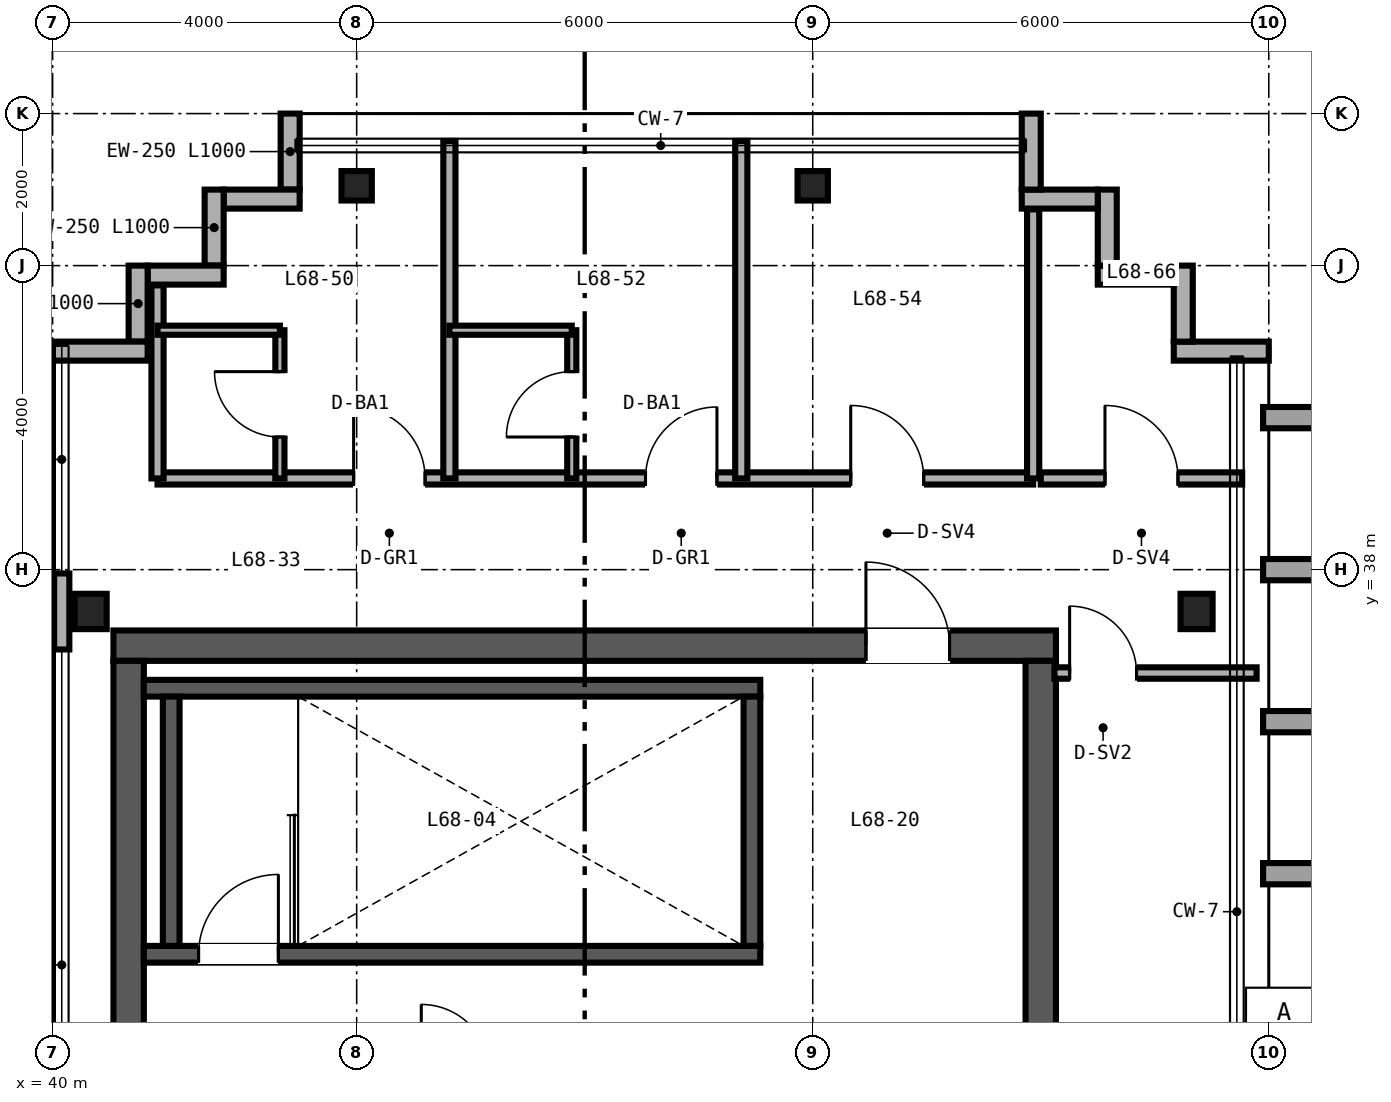
"""IFC4 building model, lengths in metres.
Left out: names, types, materials, properties, quantities, classifications, styles, units other than length and angle.
Written with IfcOpenShell. Run it as: python <this file> out.ifc"""

import sys

from ifc_helpers import new_model, si_unit, direction, frame, frame_2d, origin, origin_2d, place, context, subcontext, project, spatial, rectangle, i_section, extrude, source, transform, mapped, element, fill, save


model = new_model("IFC4")
c1 = context("Model", 3, precision=1e-05, world=origin(), true_north=direction((0.0, 1.0)))
c2 = subcontext(c1, "Body", "Model", "MODEL_VIEW")
j1 = project(units=[si_unit("LENGTHUNIT", "METRE"), si_unit("PLANEANGLEUNIT", "RADIAN")], contexts=[c1])
p1 = place(None, origin())
s1 = spatial("IfcSite", under=j1, at=p1, CompositionType="ELEMENT")
p2 = place(p1, origin())
s2 = spatial("IfcBuilding", under=s1, at=p2, CompositionType="ELEMENT")
p3 = place(p2, frame((0.0, 0.0, 268.8)))
s3 = spatial("IfcBuildingStorey", under=s2, at=p3, CompositionType="ELEMENT", Elevation=268.8)
p4 = place(p3, frame((40.8, 37.0, 0.0), z_axis=(0.0, 0.0, 1.0), x_axis=(1.0, 0.0, 0.0)))
e1 = element("IfcWall", 1, at=p4, inside=s3, PredefinedType="SHEAR", context=c2, shape_type="SweptSolid", body=[
    extrude(rectangle(XDim=12.4, YDim=0.4, at=frame_2d((6.2, 0.0))), origin(), (0.0, 0.0, 1.0), 3.28),
])
p5 = place(p4, frame((9.9, 0.0, 0.0)))
e2 = element("IfcOpeningElement", 2, at=p5, cuts=e1, PredefinedType="OPENING", context=c2, shape_type="SweptSolid", body=[
    extrude(rectangle(XDim=1.1, YDim=2.15, at=frame_2d((0.55, 1.075))), frame((0.0, 0.21, 0.0), z_axis=(0.0, -1.0, 0.0), x_axis=(1.0, 0.0, 0.0)), (0.0, 0.0, 1.0), 0.42),
])
for number, where, z_axis, x_axis in (
    (3, (41.0, 15.2, 0.0), (0.0, 0.0, 1.0), (0.0, 1.0, 0.0)),
    (4, (53.0, 15.2, 0.0), (0.0, 0.0, 1.0), (0.0, 1.0, 0.0)),
):
    element("IfcWall", number, at=place(p3, frame(where, z_axis=z_axis, x_axis=x_axis)), inside=s3, PredefinedType="SHEAR", context=c2, shape_type="SweptSolid", body=[
        extrude(rectangle(XDim=21.6, YDim=0.4, at=frame_2d((10.8, 0.0))), origin(), (0.0, 0.0, 1.0), 3.28),
    ])
p6 = place(p3, frame((41.2, 32.94, 0.0), z_axis=(0.0, 0.0, 1.0), x_axis=(1.0, 0.0, 0.0)))
e5 = element("IfcWall", 5, at=p6, inside=s3, PredefinedType="SHEAR", context=c2, shape_type="SweptSolid", body=[
    extrude(rectangle(XDim=8.11, YDim=0.22, at=frame_2d((4.055, 0.0))), origin(), (0.0, 0.0, 1.0), 3.4),
])
p7 = place(p6, frame((0.72, 0.0, 0.0)))
e6 = element("IfcOpeningElement", 6, at=p7, cuts=e5, PredefinedType="OPENING", context=c2, shape_type="SweptSolid", body=[
    extrude(rectangle(XDim=1.05, YDim=2.15, at=frame_2d((0.525, 1.075))), frame((0.0, 0.12, 0.0), z_axis=(0.0, -1.0, 0.0), x_axis=(1.0, 0.0, 0.0)), (0.0, 0.0, 1.0), 0.24),
])
p8 = place(p3, frame((41.2, 36.44, 0.0), z_axis=(0.0, 0.0, 1.0), x_axis=(1.0, 0.0, 0.0)))
e7 = element("IfcWall", 7, at=p8, inside=s3, PredefinedType="SHEAR", context=c2, shape_type="SweptSolid", body=[
    extrude(rectangle(XDim=8.11, YDim=0.22, at=frame_2d((4.055, 0.0))), origin(), (0.0, 0.0, 1.0), 3.4),
])
for number, where, z_axis, x_axis in (
    (8, (41.56, 33.05, 0.0), (0.0, 0.0, 1.0), (0.0, 1.0, 0.0)),
    (9, (49.2, 33.05, 0.0), (0.0, 0.0, 1.0), (0.0, 1.0, 0.0)),
):
    element("IfcWall", number, at=place(p3, frame(where, z_axis=z_axis, x_axis=x_axis)), inside=s3, PredefinedType="SHEAR", context=c2, shape_type="SweptSolid", body=[
        extrude(rectangle(XDim=3.28, YDim=0.22, at=frame_2d((1.64, 0.0))), origin(), (0.0, 0.0, 1.0), 3.4),
    ])
m1 = source(origin(), c2, "Body", "SweptSolid", [
    extrude(i_section(OverallWidth=0.422, OverallDepth=0.465, WebThickness=0.045, FlangeThickness=0.073, FilletRadius=0.025, at=origin_2d()), origin(), (0.0, 0.0, 1.0), 3.28),
])
for number, where, z_axis, x_axis in (
    (10, (40.5, 37.45, 0.0), (0.0, 0.0, 1.0), (1.0, 0.0, 0.0)),
    (11, (55.05, 37.45, 0.0), (0.0, 0.0, 1.0), (1.0, 0.0, 0.0)),
):
    element("IfcColumn", number, at=place(p3, frame(where, z_axis=z_axis, x_axis=x_axis)), inside=s3, PredefinedType="COLUMN", context=c2, shape_type="MappedRepresentation", body=[
        mapped(m1, transform((0.0, 0.0, 0.0), scale=1.0)),
    ])
m2 = source(origin(), c2, "Body", "SweptSolid", [
    extrude(i_section(OverallWidth=0.399, OverallDepth=0.387, WebThickness=0.021, FlangeThickness=0.033, FilletRadius=0.025, at=origin_2d()), origin(), (0.0, 0.0, 1.0), 3.28),
])
for number, where, z_axis, x_axis in (
    (12, (44.0, 43.05, 0.0), (0.0, 0.0, 1.0), (1.0, 0.0, 0.0)),
    (13, (50.0, 43.05, 0.0), (0.0, 0.0, 1.0), (1.0, 0.0, 0.0)),
):
    element("IfcColumn", number, at=place(p3, frame(where, z_axis=z_axis, x_axis=x_axis)), inside=s3, PredefinedType="COLUMN", context=c2, shape_type="MappedRepresentation", body=[
        mapped(m2, transform((0.0, 0.0, 0.0), scale=1.0)),
    ])
p9 = place(p3, frame((56.0, 40.875, 0.0), z_axis=(0.0, 0.0, 1.0), x_axis=(-1.0, 0.0, 0.0)))
e14 = element("IfcWall", 14, at=p9, inside=s3, PredefinedType="SOLIDWALL", context=c2, shape_type="SweptSolid", body=[
    extrude(rectangle(XDim=1.25, YDim=0.25, at=frame_2d((0.625, 0.0))), origin(), (0.0, 0.0, 1.0), 3.28),
])
for number, where, z_axis, x_axis in (
    (15, (54.875, 41.0, 0.0), (0.0, 0.0, 1.0), (0.0, 1.0, 0.0)),
    (16, (54.75, 41.875, 0.0), (0.0, 0.0, 1.0), (-1.0, 0.0, 0.0)),
    (17, (53.875, 42.0, 0.0), (0.0, 0.0, 1.0), (0.0, 1.0, 0.0)),
    (18, (53.75, 42.875, 0.0), (0.0, 0.0, 1.0), (-1.0, 0.0, 0.0)),
    (19, (52.875, 43.0, 0.0), (0.0, 0.0, 1.0), (0.0, 1.0, 0.0)),
    (20, (43.125, 44.0, 0.0), (0.0, 0.0, 1.0), (0.0, -1.0, 0.0)),
    (21, (43.25, 42.875, 0.0), (0.0, 0.0, 1.0), (-1.0, 0.0, 0.0)),
    (22, (42.125, 43.0, 0.0), (0.0, 0.0, 1.0), (0.0, -1.0, 0.0)),
    (23, (42.25, 41.875, 0.0), (0.0, 0.0, 1.0), (-1.0, 0.0, 0.0)),
    (24, (41.125, 42.0, 0.0), (0.0, 0.0, 1.0), (0.0, -1.0, 0.0)),
):
    element("IfcWall", number, at=place(p3, frame(where, z_axis=z_axis, x_axis=x_axis)), inside=s3, PredefinedType="SOLIDWALL", context=c2, shape_type="SweptSolid", body=[
        extrude(rectangle(XDim=1.0, YDim=0.25, at=frame_2d((0.5, 0.0))), origin(), (0.0, 0.0, 1.0), 3.28),
    ])
p10 = place(p3, frame((41.25, 40.875, 0.0), z_axis=(0.0, 0.0, 1.0), x_axis=(-1.0, 0.0, 0.0)))
e25 = element("IfcWall", 25, at=p10, inside=s3, PredefinedType="SOLIDWALL", context=c2, shape_type="SweptSolid", body=[
    extrude(rectangle(XDim=1.25, YDim=0.25, at=frame_2d((0.625, 0.0))), origin(), (0.0, 0.0, 1.0), 3.28),
])
p11 = place(p3, frame((40.12, 36.95, 0.0), z_axis=(0.0, 0.0, 1.0), x_axis=(0.0, 1.0, 0.0)))
e26 = element("IfcWall", 26, at=p11, inside=s3, PredefinedType="PARAPET", context=c2, shape_type="SweptSolid", body=[
    extrude(rectangle(XDim=1.0, YDim=0.2, at=frame_2d((0.5, 0.0))), origin(), (0.0, 0.0, 1.0), 1.73),
])
p12 = place(p3, frame((41.38, 39.2, 0.0), z_axis=(0.0, 0.0, 1.0), x_axis=(1.0, 0.0, 0.0)))
e27 = element("IfcWall", 27, at=p12, inside=s3, PredefinedType="PARTITIONING", context=c2, shape_type="SweptSolid", body=[
    extrude(rectangle(XDim=11.52, YDim=0.16, at=frame_2d((5.76, 0.0))), origin(), (0.0, 0.0, 1.0), 3.28),
])
p13 = place(p12, frame((2.58, 0.0, 0.0)))
e28 = element("IfcOpeningElement", 28, at=p13, cuts=e27, PredefinedType="OPENING", context=c2, shape_type="SweptSolid", body=[
    extrude(rectangle(XDim=0.94, YDim=2.15, at=frame_2d((0.47, 1.075))), frame((0.0, 0.09, 0.0), z_axis=(0.0, -1.0, 0.0), x_axis=(1.0, 0.0, 0.0)), (0.0, 0.0, 1.0), 0.18),
])
p14 = place(p12, frame((6.42, 0.0, 0.0)))
e29 = element("IfcOpeningElement", 29, at=p14, cuts=e27, PredefinedType="OPENING", context=c2, shape_type="SweptSolid", body=[
    extrude(rectangle(XDim=0.94, YDim=2.15, at=frame_2d((0.47, 1.075))), frame((0.0, 0.09, 0.0), z_axis=(0.0, -1.0, 0.0), x_axis=(1.0, 0.0, 0.0)), (0.0, 0.0, 1.0), 0.18),
])
p15 = place(p12, frame((9.12, 0.0, 0.0)))
e30 = element("IfcOpeningElement", 30, at=p15, cuts=e27, PredefinedType="OPENING", context=c2, shape_type="SweptSolid", body=[
    extrude(rectangle(XDim=0.96, YDim=2.15, at=frame_2d((0.48, 1.075))), frame((0.0, 0.09, 0.0), z_axis=(0.0, -1.0, 0.0), x_axis=(1.0, 0.0, 0.0)), (0.0, 0.0, 1.0), 0.18),
])
p16 = place(p3, frame((41.38, 39.2, 0.0), z_axis=(0.0, 0.0, 1.0), x_axis=(0.0, 1.0, 0.0)))
e31 = element("IfcWall", 31, at=p16, inside=s3, PredefinedType="PARTITIONING", context=c2, shape_type="SweptSolid", body=[
    extrude(rectangle(XDim=2.54, YDim=0.16, at=frame_2d((1.27, 0.0))), origin(), (0.0, 0.0, 1.0), 3.28),
])
p17 = place(p3, frame((52.9, 39.2, 0.0), z_axis=(0.0, 0.0, 1.0), x_axis=(0.0, 1.0, 0.0)))
e32 = element("IfcWall", 32, at=p17, inside=s3, PredefinedType="PARTITIONING", context=c2, shape_type="SweptSolid", body=[
    extrude(rectangle(XDim=3.54, YDim=0.16, at=frame_2d((1.77, 0.0))), origin(), (0.0, 0.0, 1.0), 3.28),
])
p18 = place(p3, frame((45.22, 39.2, 0.0), z_axis=(0.0, 0.0, 1.0), x_axis=(0.0, 1.0, 0.0)))
e33 = element("IfcWall", 33, at=p18, inside=s3, PredefinedType="PARTITIONING", context=c2, shape_type="SweptSolid", body=[
    extrude(rectangle(XDim=4.44, YDim=0.16, at=frame_2d((2.22, 0.0))), origin(), (0.0, 0.0, 1.0), 2.587),
])
p19 = place(p3, frame((42.99, 39.2, 0.0), z_axis=(0.0, 0.0, 1.0), x_axis=(0.0, 1.0, 0.0)))
e34 = element("IfcWall", 34, at=p19, inside=s3, PredefinedType="PARTITIONING", context=c2, shape_type="SweptSolid", body=[
    extrude(rectangle(XDim=1.95, YDim=0.12, at=frame_2d((0.975, 0.0))), origin(), (0.0, 0.0, 1.0), 3.28),
])
p20 = place(p19, frame((0.545, 0.0, 0.0)))
e35 = element("IfcOpeningElement", 35, at=p20, cuts=e34, PredefinedType="OPENING", context=c2, shape_type="SweptSolid", body=[
    extrude(rectangle(XDim=0.86, YDim=2.1, at=frame_2d((0.43, 1.05))), frame((0.0, 0.07, 0.0), z_axis=(0.0, -1.0, 0.0), x_axis=(1.0, 0.0, 0.0)), (0.0, 0.0, 1.0), 0.14),
])
p21 = place(p3, frame((41.38, 41.15, 0.0), z_axis=(0.0, 0.0, 1.0), x_axis=(1.0, 0.0, 0.0)))
e36 = element("IfcWall", 36, at=p21, inside=s3, PredefinedType="PARTITIONING", context=c2, shape_type="SweptSolid", body=[
    extrude(rectangle(XDim=1.61, YDim=0.12, at=frame_2d((0.805, 0.0))), origin(), (0.0, 0.0, 1.0), 3.28),
])
p22 = place(p3, frame((49.06, 39.2, 0.0), z_axis=(0.0, 0.0, 1.0), x_axis=(0.0, 1.0, 0.0)))
e37 = element("IfcWall", 37, at=p22, inside=s3, PredefinedType="PARTITIONING", context=c2, shape_type="SweptSolid", body=[
    extrude(rectangle(XDim=4.44, YDim=0.16, at=frame_2d((2.22, 0.0))), origin(), (0.0, 0.0, 1.0), 2.587),
])
p23 = place(p3, frame((46.83, 39.2, 0.0), z_axis=(0.0, 0.0, 1.0), x_axis=(0.0, 1.0, 0.0)))
e38 = element("IfcWall", 38, at=p23, inside=s3, PredefinedType="PARTITIONING", context=c2, shape_type="SweptSolid", body=[
    extrude(rectangle(XDim=1.95, YDim=0.12, at=frame_2d((0.975, 0.0))), origin(), (0.0, 0.0, 1.0), 3.28),
])
p24 = place(p23, frame((0.545, 0.0, 0.0)))
e39 = element("IfcOpeningElement", 39, at=p24, cuts=e38, PredefinedType="OPENING", context=c2, shape_type="SweptSolid", body=[
    extrude(rectangle(XDim=0.86, YDim=2.1, at=frame_2d((0.43, 1.05))), frame((0.0, 0.07, 0.0), z_axis=(0.0, -1.0, 0.0), x_axis=(1.0, 0.0, 0.0)), (0.0, 0.0, 1.0), 0.14),
])
p25 = place(p3, frame((45.22, 41.15, 0.0), z_axis=(0.0, 0.0, 1.0), x_axis=(1.0, 0.0, 0.0)))
e40 = element("IfcWall", 40, at=p25, inside=s3, PredefinedType="PARTITIONING", context=c2, shape_type="SweptSolid", body=[
    extrude(rectangle(XDim=1.61, YDim=0.12, at=frame_2d((0.805, 0.0))), origin(), (0.0, 0.0, 1.0), 3.28),
])
p26 = place(p3, frame((53.18, 36.64, 0.0), z_axis=(0.0, 0.0, 1.0), x_axis=(1.0, 0.0, 0.0)))
e41 = element("IfcWall", 41, at=p26, inside=s3, PredefinedType="PARTITIONING", context=c2, shape_type="SweptSolid", body=[
    extrude(rectangle(XDim=2.66, YDim=0.15, at=frame_2d((1.33, 0.0))), origin(), (0.0, 0.0, 1.0), 2.663),
])
p27 = place(p26, frame((0.2, 0.0, 0.0)))
e42 = element("IfcOpeningElement", 42, at=p27, cuts=e41, PredefinedType="OPENING", context=c2, shape_type="SweptSolid", body=[
    extrude(rectangle(XDim=0.88, YDim=2.15, at=frame_2d((0.44, 1.075))), frame((0.0, 0.085, 0.0), z_axis=(0.0, -1.0, 0.0), x_axis=(1.0, 0.0, 0.0)), (0.0, 0.0, 1.0), 0.17),
])
p28 = place(p3, frame((53.0, 39.2, 0.0), z_axis=(0.0, 0.0, 1.0), x_axis=(1.0, 0.0, 0.0)))
e43 = element("IfcWall", 43, at=p28, inside=s3, PredefinedType="PARTITIONING", context=c2, shape_type="SweptSolid", body=[
    extrude(rectangle(XDim=2.65, YDim=0.16, at=frame_2d((1.325, 0.0))), origin(), (0.0, 0.0, 1.0), 3.28),
])
p29 = place(p28, frame((0.845, 0.0, 0.0)))
e44 = element("IfcOpeningElement", 44, at=p29, cuts=e43, PredefinedType="OPENING", context=c2, shape_type="SweptSolid", body=[
    extrude(rectangle(XDim=0.96, YDim=2.15, at=frame_2d((0.48, 1.075))), frame((0.0, 0.09, 0.0), z_axis=(0.0, -1.0, 0.0), x_axis=(1.0, 0.0, 0.0)), (0.0, 0.0, 1.0), 0.18),
])
m3 = source(origin(), c2, "Body", "SweptSolid", [
    extrude(rectangle(XDim=1.05, YDim=2.15, at=frame_2d((0.525, 1.075))), frame((0.0, 0.025, 0.0), z_axis=(0.0, -1.0, 0.0), x_axis=(1.0, 0.0, 0.0)), (0.0, 0.0, 1.0), 0.05),
])
p30 = place(p7, origin())
e45 = element("IfcDoor", 45, at=p30, inside=s3, OperationType="SINGLE_SWING_RIGHT", PredefinedType="DOOR", context=c2, shape_type="MappedRepresentation", body=[
    mapped(m3, transform((0.0, 0.0, 0.0), scale=1.0)),
])
fill(e6, e45)
m4 = source(origin(), c2, "Body", "SweptSolid", [
    extrude(rectangle(XDim=1.1, YDim=2.15, at=frame_2d((0.55, 1.075))), frame((0.0, 0.025, 0.0), z_axis=(0.0, -1.0, 0.0), x_axis=(1.0, 0.0, 0.0)), (0.0, 0.0, 1.0), 0.05),
])
p31 = place(p5, origin())
e46 = element("IfcDoor", 46, at=p31, inside=s3, OperationType="SINGLE_SWING_LEFT", PredefinedType="DOOR", context=c2, shape_type="MappedRepresentation", body=[
    mapped(m4, transform((0.0, 0.0, 0.0), scale=1.0)),
])
fill(e2, e46)
m5 = source(origin(), c2, "Body", "SweptSolid", [
    extrude(rectangle(XDim=0.86, YDim=2.1, at=frame_2d((0.43, 1.05))), frame((0.0, 0.025, 0.0), z_axis=(0.0, -1.0, 0.0), x_axis=(1.0, 0.0, 0.0)), (0.0, 0.0, 1.0), 0.05),
])
p32 = place(p20, origin())
e47 = element("IfcDoor", 47, at=p32, inside=s3, OperationType="SINGLE_SWING_RIGHT", PredefinedType="DOOR", context=c2, shape_type="MappedRepresentation", body=[
    mapped(m5, transform((0.0, 0.0, 0.0), scale=1.0)),
])
fill(e35, e47)
p33 = place(p24, origin())
e48 = element("IfcDoor", 48, at=p33, inside=s3, OperationType="SINGLE_SWING_LEFT", PredefinedType="DOOR", context=c2, shape_type="MappedRepresentation", body=[
    mapped(m5, transform((0.0, 0.0, 0.0), scale=1.0)),
])
fill(e39, e48)
m6 = source(origin(), c2, "Body", "SweptSolid", [
    extrude(rectangle(XDim=0.94, YDim=2.15, at=frame_2d((0.47, 1.075))), frame((0.0, 0.025, 0.0), z_axis=(0.0, -1.0, 0.0), x_axis=(1.0, 0.0, 0.0)), (0.0, 0.0, 1.0), 0.05),
])
p34 = place(p13, origin())
e49 = element("IfcDoor", 49, at=p34, inside=s3, OperationType="SINGLE_SWING_LEFT", PredefinedType="DOOR", context=c2, shape_type="MappedRepresentation", body=[
    mapped(m6, transform((0.0, 0.0, 0.0), scale=1.0)),
])
fill(e28, e49)
p35 = place(p14, origin())
e50 = element("IfcDoor", 50, at=p35, inside=s3, OperationType="SINGLE_SWING_RIGHT", PredefinedType="DOOR", context=c2, shape_type="MappedRepresentation", body=[
    mapped(m6, transform((0.0, 0.0, 0.0), scale=1.0)),
])
fill(e29, e50)
m7 = source(origin(), c2, "Body", "SweptSolid", [
    extrude(rectangle(XDim=0.96, YDim=2.15, at=frame_2d((0.48, 1.075))), frame((0.0, 0.025, 0.0), z_axis=(0.0, -1.0, 0.0), x_axis=(1.0, 0.0, 0.0)), (0.0, 0.0, 1.0), 0.05),
])
p36 = place(p15, origin())
e51 = element("IfcDoor", 51, at=p36, inside=s3, OperationType="SINGLE_SWING_LEFT", PredefinedType="DOOR", context=c2, shape_type="MappedRepresentation", body=[
    mapped(m7, transform((0.0, 0.0, 0.0), scale=1.0)),
])
fill(e30, e51)
m8 = source(origin(), c2, "Body", "SweptSolid", [
    extrude(rectangle(XDim=0.88, YDim=2.15, at=frame_2d((0.44, 1.075))), frame((0.0, 0.025, 0.0), z_axis=(0.0, -1.0, 0.0), x_axis=(1.0, 0.0, 0.0)), (0.0, 0.0, 1.0), 0.05),
])
p37 = place(p27, origin())
e52 = element("IfcDoor", 52, at=p37, inside=s3, OperationType="SINGLE_SWING_LEFT", PredefinedType="DOOR", context=c2, shape_type="MappedRepresentation", body=[
    mapped(m8, transform((0.0, 0.0, 0.0), scale=1.0)),
])
fill(e42, e52)
p38 = place(p29, origin())
e53 = element("IfcDoor", 53, at=p38, inside=s3, OperationType="SINGLE_SWING_LEFT", PredefinedType="DOOR", context=c2, shape_type="MappedRepresentation", body=[
    mapped(m7, transform((0.0, 0.0, 0.0), scale=1.0)),
])
fill(e44, e53)
save(model, sys.argv[1])
